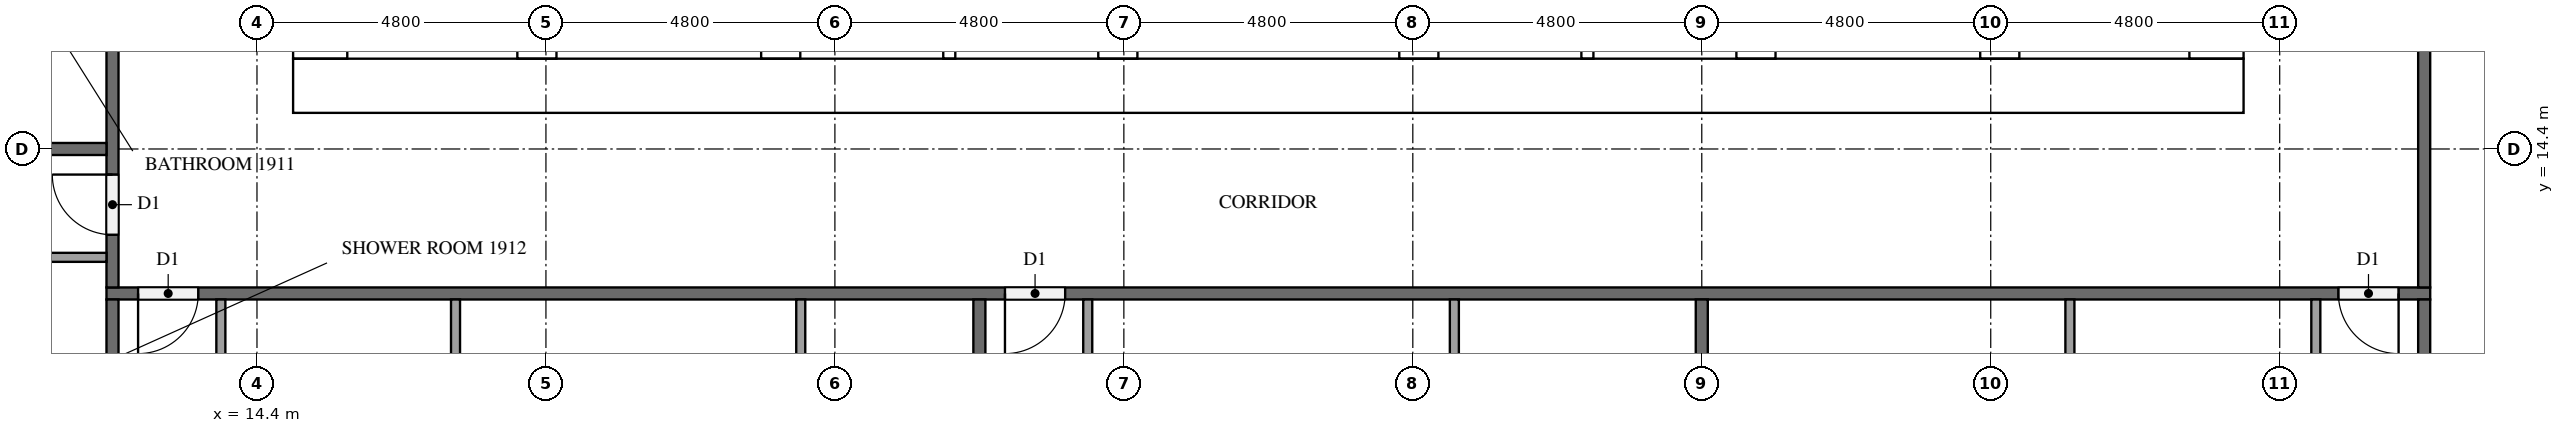
"""IFC4 building model, lengths in metres.
Left out: names, types, materials, properties, quantities, classifications, styles, units other than length and angle.
Written with IfcOpenShell. Run it as: python <this file> out.ifc"""

import sys

from ifc_helpers import new_model, si_unit, direction, frame, frame_2d, origin, place, context, subcontext, project, spatial, rectangle, extrude, element, fill, save


model = new_model("IFC4")
c1 = context("Model", 3, precision=1e-05, world=origin(), true_north=direction((0.0, 1.0)))
c2 = subcontext(c1, "Body", "Model", "MODEL_VIEW")
j1 = project(units=[si_unit("LENGTHUNIT", "METRE"), si_unit("PLANEANGLEUNIT", "RADIAN")], contexts=[c1])
p1 = place(None, origin())
s1 = spatial("IfcSite", under=j1, at=p1, CompositionType="ELEMENT")
p2 = place(p1, origin())
s2 = spatial("IfcBuilding", under=s1, at=p2, CompositionType="ELEMENT")
p3 = place(p2, frame((0.0, 0.0, 76.8)))
s3 = spatial("IfcBuildingStorey", under=s2, at=p3, CompositionType="ELEMENT", Elevation=76.8)
p4 = place(p3, frame((15.0, 15.45, 0.0), z_axis=(0.0, 0.0, 1.0), x_axis=(1.0, 0.0, 0.0)))
e1 = element("IfcWall", 1, at=p4, inside=s3, PredefinedType="SHEAR", context=c2, shape_type="SweptSolid", body=[
    extrude(rectangle(XDim=32.4, YDim=0.9, at=frame_2d((16.2, 0.0))), origin(), (0.0, 0.0, 1.0), 3.2),
])
p5 = place(p4, frame((15.3, 0.0, 0.0)))
e2 = element("IfcOpeningElement", 2, at=p5, cuts=e1, PredefinedType="OPENING", context=c2, shape_type="SweptSolid", body=[
    extrude(rectangle(XDim=1.8, YDim=2.1, at=frame_2d((0.9, 1.05))), frame((0.0, 0.46, 0.0), z_axis=(0.0, -1.0, 0.0), x_axis=(1.0, 0.0, 0.0)), (0.0, 0.0, 1.0), 0.92),
])
p6 = place(p3, frame((15.45, 15.9, 0.0), z_axis=(0.0, 0.0, 1.0), x_axis=(0.0, 1.0, 0.0)))
e3 = element("IfcWall", 3, at=p6, inside=s3, PredefinedType="SHEAR", context=c2, shape_type="SweptSolid", body=[
    extrude(rectangle(XDim=21.0, YDim=0.9, at=frame_2d((10.5, 0.0))), origin(), (0.0, 0.0, 1.0), 3.2),
])
p7 = place(p6, frame((4.86, 0.0, 0.0)))
e4 = element("IfcOpeningElement", 4, at=p7, cuts=e3, PredefinedType="OPENING", context=c2, shape_type="SweptSolid", body=[
    extrude(rectangle(XDim=1.2, YDim=2.1, at=frame_2d((0.6, 1.05))), frame((0.0, 0.46, 0.0), z_axis=(0.0, -1.0, 0.0), x_axis=(1.0, 0.0, 0.0)), (0.0, 0.0, 1.0), 0.92),
])
p8 = place(p3, frame((46.95, 15.9, 0.0), z_axis=(0.0, 0.0, 1.0), x_axis=(0.0, 1.0, 0.0)))
e5 = element("IfcWall", 5, at=p8, inside=s3, PredefinedType="SHEAR", context=c2, shape_type="SweptSolid", body=[
    extrude(rectangle(XDim=21.0, YDim=0.9, at=frame_2d((10.5, 0.0))), origin(), (0.0, 0.0, 1.0), 3.2),
])
p9 = place(p8, frame((10.2, 0.0, 0.0)))
e6 = element("IfcOpeningElement", 6, at=p9, cuts=e5, PredefinedType="OPENING", context=c2, shape_type="SweptSolid", body=[
    extrude(rectangle(XDim=1.2, YDim=2.1, at=frame_2d((0.6, 1.05))), frame((0.0, 0.46, 0.0), z_axis=(0.0, -1.0, 0.0), x_axis=(1.0, 0.0, 0.0)), (0.0, 0.0, 1.0), 0.92),
])
p10 = place(p3, frame((19.05, 15.9, 0.0), z_axis=(0.0, 0.0, 1.0), x_axis=(0.0, 1.0, 0.0)))
e7 = element("IfcWall", 7, at=p10, inside=s3, PredefinedType="SHEAR", context=c2, shape_type="SweptSolid", body=[
    extrude(rectangle(XDim=15.025, YDim=0.65, at=frame_2d((7.513, 0.0))), origin(), (0.0, 0.0, 1.0), 3.2),
])
p11 = place(p10, frame((9.55, 0.0, 0.0)))
e8 = element("IfcOpeningElement", 8, at=p11, cuts=e7, PredefinedType="OPENING", context=c2, shape_type="SweptSolid", body=[
    extrude(rectangle(XDim=1.1, YDim=2.1, at=frame_2d((0.55, 1.05))), frame((0.0, 0.335, 0.0), z_axis=(0.0, -1.0, 0.0), x_axis=(1.0, 0.0, 0.0)), (0.0, 0.0, 1.0), 0.67),
])
p12 = place(p10, frame((13.05, 0.0, 0.0)))
e9 = element("IfcOpeningElement", 9, at=p12, cuts=e7, PredefinedType="OPENING", context=c2, shape_type="SweptSolid", body=[
    extrude(rectangle(XDim=1.1, YDim=2.1, at=frame_2d((0.55, 1.05))), frame((0.0, 0.335, 0.0), z_axis=(0.0, -1.0, 0.0), x_axis=(1.0, 0.0, 0.0)), (0.0, 0.0, 1.0), 0.67),
])
p13 = place(p10, frame((0.3, 0.0, 0.0)))
e10 = element("IfcOpeningElement", 10, at=p13, cuts=e7, PredefinedType="OPENING", context=c2, shape_type="SweptSolid", body=[
    extrude(rectangle(XDim=1.2, YDim=2.1, at=frame_2d((0.6, 1.05))), frame((0.0, 0.335, 0.0), z_axis=(0.0, -1.0, 0.0), x_axis=(1.0, 0.0, 0.0)), (0.0, 0.0, 1.0), 0.67),
])
p14 = place(p3, frame((23.1, 15.9, 0.0), z_axis=(0.0, 0.0, 1.0), x_axis=(0.0, 1.0, 0.0)))
e11 = element("IfcWall", 11, at=p14, inside=s3, PredefinedType="SHEAR", context=c2, shape_type="SweptSolid", body=[
    extrude(rectangle(XDim=21.0, YDim=0.65, at=frame_2d((10.5, 0.0))), origin(), (0.0, 0.0, 1.0), 3.2),
])
p15 = place(p3, frame((39.3, 15.9, 0.0), z_axis=(0.0, 0.0, 1.0), x_axis=(0.0, 1.0, 0.0)))
e12 = element("IfcWall", 12, at=p15, inside=s3, PredefinedType="SHEAR", context=c2, shape_type="SweptSolid", body=[
    extrude(rectangle(XDim=8.35, YDim=0.65, at=frame_2d((4.175, 0.0))), origin(), (0.0, 0.0, 1.0), 3.2),
])
p16 = place(p3, frame((43.35, 15.9, 0.0), z_axis=(0.0, 0.0, 1.0), x_axis=(0.0, 1.0, 0.0)))
e13 = element("IfcWall", 13, at=p16, inside=s3, PredefinedType="SHEAR", context=c2, shape_type="SweptSolid", body=[
    extrude(rectangle(XDim=8.35, YDim=0.65, at=frame_2d((4.175, 0.0))), origin(), (0.0, 0.0, 1.0), 3.2),
])
p17 = place(p16, frame((0.3, 0.0, 0.0)))
e14 = element("IfcOpeningElement", 14, at=p17, cuts=e13, PredefinedType="OPENING", context=c2, shape_type="SweptSolid", body=[
    extrude(rectangle(XDim=1.2, YDim=2.1, at=frame_2d((0.6, 1.05))), frame((0.0, 0.335, 0.0), z_axis=(0.0, -1.0, 0.0), x_axis=(1.0, 0.0, 0.0)), (0.0, 0.0, 1.0), 0.67),
])
for number, where, z_axis, x_axis in (
    (15, (28.7, 15.9, 0.0), (0.0, 0.0, 1.0), (0.0, 1.0, 0.0)),
    (16, (33.7, 15.9, 0.0), (0.0, 0.0, 1.0), (0.0, 1.0, 0.0)),
):
    element("IfcWall", number, at=place(p3, frame(where, z_axis=z_axis, x_axis=x_axis)), inside=s3, PredefinedType="SHEAR", context=c2, shape_type="SweptSolid", body=[
        extrude(rectangle(XDim=2.525, YDim=0.65, at=frame_2d((1.263, 0.0))), origin(), (0.0, 0.0, 1.0), 3.2),
    ])
for number, where, z_axis, x_axis in (
    (17, (25.9, 15.9, 0.0), (0.0, 0.0, 1.0), (0.0, 1.0, 0.0)),
    (18, (36.5, 15.9, 0.0), (0.0, 0.0, 1.0), (0.0, 1.0, 0.0)),
):
    element("IfcWall", number, at=place(p3, frame(where, z_axis=z_axis, x_axis=x_axis)), inside=s3, PredefinedType="SOLIDWALL", context=c2, shape_type="SweptSolid", body=[
        extrude(rectangle(XDim=2.525, YDim=0.2, at=frame_2d((1.263, 0.0))), origin(), (0.0, 0.0, 1.0), 3.2),
    ])
p18 = place(p3, frame((50.5, 12.0, 0.0), z_axis=(0.0, 0.0, 1.0), x_axis=(-1.0, 0.0, 0.0)))
e19 = element("IfcWall", 19, at=p18, inside=s3, PredefinedType="PARTITIONING", context=c2, shape_type="SweptSolid", body=[
    extrude(rectangle(XDim=38.6, YDim=0.2, at=frame_2d((19.3, 0.0))), origin(), (0.0, 0.0, 1.0), 3.2),
])
p19 = place(p18, frame((37.075, 0.0, 0.0)))
e20 = element("IfcOpeningElement", 20, at=p19, cuts=e19, PredefinedType="OPENING", context=c2, shape_type="SweptSolid", body=[
    extrude(rectangle(XDim=1.0, YDim=2.1, at=frame_2d((0.5, 1.05))), frame((0.0, 0.11, 0.0), z_axis=(0.0, -1.0, 0.0), x_axis=(1.0, 0.0, 0.0)), (0.0, 0.0, 1.0), 0.22),
])
p20 = place(p18, frame((22.675, 0.0, 0.0)))
e21 = element("IfcOpeningElement", 21, at=p20, cuts=e19, PredefinedType="OPENING", context=c2, shape_type="SweptSolid", body=[
    extrude(rectangle(XDim=1.0, YDim=2.1, at=frame_2d((0.5, 1.05))), frame((0.0, 0.11, 0.0), z_axis=(0.0, -1.0, 0.0), x_axis=(1.0, 0.0, 0.0)), (0.0, 0.0, 1.0), 0.22),
])
p21 = place(p18, frame((0.525, 0.0, 0.0)))
e22 = element("IfcOpeningElement", 22, at=p21, cuts=e19, PredefinedType="OPENING", context=c2, shape_type="SweptSolid", body=[
    extrude(rectangle(XDim=1.0, YDim=2.1, at=frame_2d((0.5, 1.05))), frame((0.0, 0.11, 0.0), z_axis=(0.0, -1.0, 0.0), x_axis=(1.0, 0.0, 0.0)), (0.0, 0.0, 1.0), 0.22),
])
p22 = place(p3, frame((50.4, 40.7, 0.0), z_axis=(0.0, 0.0, 1.0), x_axis=(0.0, -1.0, 0.0)))
e23 = element("IfcWall", 23, at=p22, inside=s3, PredefinedType="PARTITIONING", context=c2, shape_type="SweptSolid", body=[
    extrude(rectangle(XDim=28.6, YDim=0.2, at=frame_2d((14.3, 0.0))), origin(), (0.0, 0.0, 1.0), 3.2),
])
p23 = place(p22, frame((21.875, 0.0, 0.0)))
e24 = element("IfcOpeningElement", 24, at=p23, cuts=e23, PredefinedType="OPENING", context=c2, shape_type="SweptSolid", body=[
    extrude(rectangle(XDim=1.1, YDim=2.1, at=frame_2d((0.55, 1.05))), frame((0.0, 0.11, 0.0), z_axis=(0.0, -1.0, 0.0), x_axis=(1.0, 0.0, 0.0)), (0.0, 0.0, 1.0), 0.22),
])
p24 = place(p22, frame((20.075, 0.0, 0.0)))
e25 = element("IfcOpeningElement", 25, at=p24, cuts=e23, PredefinedType="OPENING", context=c2, shape_type="SweptSolid", body=[
    extrude(rectangle(XDim=1.0, YDim=2.1, at=frame_2d((0.5, 1.05))), frame((0.0, 0.11, 0.0), z_axis=(0.0, -1.0, 0.0), x_axis=(1.0, 0.0, 0.0)), (0.0, 0.0, 1.0), 0.22),
])
p25 = place(p22, frame((5.675, 0.0, 0.0)))
e26 = element("IfcOpeningElement", 26, at=p25, cuts=e23, PredefinedType="OPENING", context=c2, shape_type="SweptSolid", body=[
    extrude(rectangle(XDim=1.0, YDim=2.1, at=frame_2d((0.5, 1.05))), frame((0.0, 0.11, 0.0), z_axis=(0.0, -1.0, 0.0), x_axis=(1.0, 0.0, 0.0)), (0.0, 0.0, 1.0), 0.22),
])
p26 = place(p3, frame((12.0, 12.1, 0.0), z_axis=(0.0, 0.0, 1.0), x_axis=(0.0, 1.0, 0.0)))
e27 = element("IfcWall", 27, at=p26, inside=s3, PredefinedType="PARTITIONING", context=c2, shape_type="SweptSolid", body=[
    extrude(rectangle(XDim=28.6, YDim=0.2, at=frame_2d((14.3, 0.0))), origin(), (0.0, 0.0, 1.0), 3.2),
])
p27 = place(p26, frame((14.725, 0.0, 0.0)))
e28 = element("IfcOpeningElement", 28, at=p27, cuts=e27, PredefinedType="OPENING", context=c2, shape_type="SweptSolid", body=[
    extrude(rectangle(XDim=1.0, YDim=2.1, at=frame_2d((0.5, 1.05))), frame((0.0, 0.11, 0.0), z_axis=(0.0, -1.0, 0.0), x_axis=(1.0, 0.0, 0.0)), (0.0, 0.0, 1.0), 0.22),
])
p28 = place(p26, frame((12.875, 0.0, 0.0)))
e29 = element("IfcOpeningElement", 29, at=p28, cuts=e27, PredefinedType="OPENING", context=c2, shape_type="SweptSolid", body=[
    extrude(rectangle(XDim=1.0, YDim=2.1, at=frame_2d((0.5, 1.05))), frame((0.0, 0.11, 0.0), z_axis=(0.0, -1.0, 0.0), x_axis=(1.0, 0.0, 0.0)), (0.0, 0.0, 1.0), 0.22),
])
p29 = place(p26, frame((0.875, 0.0, 0.0)))
e30 = element("IfcOpeningElement", 30, at=p29, cuts=e27, PredefinedType="OPENING", context=c2, shape_type="SweptSolid", body=[
    extrude(rectangle(XDim=1.0, YDim=2.1, at=frame_2d((0.5, 1.05))), frame((0.0, 0.11, 0.0), z_axis=(0.0, -1.0, 0.0), x_axis=(1.0, 0.0, 0.0)), (0.0, 0.0, 1.0), 0.22),
])
for number, where, z_axis, x_axis in (
    (31, (26.4, 11.9, 0.0), (0.0, 0.0, 1.0), (0.0, -1.0, 0.0)),
    (32, (12.0, 0.1, 0.0), (0.0, 0.0, 1.0), (0.0, 1.0, 0.0)),
):
    element("IfcWall", number, at=place(p3, frame(where, z_axis=z_axis, x_axis=x_axis)), inside=s3, PredefinedType="PARTITIONING", context=c2, shape_type="SweptSolid", body=[
        extrude(rectangle(XDim=11.8, YDim=0.2, at=frame_2d((5.9, 0.0))), origin(), (0.0, 0.0, 1.0), 3.2),
    ])
p30 = place(p3, frame((38.4, 11.9, 0.0), z_axis=(0.0, 0.0, 1.0), x_axis=(0.0, -1.0, 0.0)))
e33 = element("IfcWall", 33, at=p30, inside=s3, PredefinedType="PARTITIONING", context=c2, shape_type="SweptSolid", body=[
    extrude(rectangle(XDim=11.475, YDim=0.2, at=frame_2d((5.737, 0.0))), origin(), (0.0, 0.0, 1.0), 3.2),
])
p31 = place(p3, frame((50.4, 11.9, 0.0), z_axis=(0.0, 0.0, 1.0), x_axis=(0.0, -1.0, 0.0)))
e34 = element("IfcWall", 34, at=p31, inside=s3, PredefinedType="PARTITIONING", context=c2, shape_type="SweptSolid", body=[
    extrude(rectangle(XDim=11.8, YDim=0.2, at=frame_2d((5.9, 0.0))), origin(), (0.0, 0.0, 1.0), 3.2),
])
p32 = place(p3, frame((5.225, 14.4, 0.0), z_axis=(0.0, 0.0, 1.0), x_axis=(1.0, 0.0, 0.0)))
e35 = element("IfcWall", 35, at=p32, inside=s3, PredefinedType="PARTITIONING", context=c2, shape_type="SweptSolid", body=[
    extrude(rectangle(XDim=6.675, YDim=0.2, at=frame_2d((3.337, 0.0))), origin(), (0.0, 0.0, 1.0), 3.2),
])
for number, where, z_axis, x_axis in (
    (36, (17.698, 11.9, 0.0), (0.0, 0.0, 1.0), (0.0, -1.0, 0.0)),
    (37, (23.433, 11.9, 0.0), (0.0, 0.0, 1.0), (0.0, -1.0, 0.0)),
):
    element("IfcWall", number, at=place(p3, frame(where, z_axis=z_axis, x_axis=x_axis)), inside=s3, PredefinedType="PARTITIONING", context=c2, shape_type="SweptSolid", body=[
        extrude(rectangle(XDim=2.975, YDim=0.15, at=frame_2d((1.487, 0.0))), origin(), (0.0, 0.0, 1.0), 3.2),
    ])
p33 = place(p3, frame((13.8, 11.9, 0.0), z_axis=(0.0, 0.0, 1.0), x_axis=(0.0, -1.0, 0.0)))
e38 = element("IfcWall", 38, at=p33, inside=s3, PredefinedType="PARTITIONING", context=c2, shape_type="SweptSolid", body=[
    extrude(rectangle(XDim=3.125, YDim=0.15, at=frame_2d((1.562, 0.0))), origin(), (0.0, 0.0, 1.0), 3.2),
])
p34 = place(p3, frame((34.29, 11.9, 0.0), z_axis=(0.0, 0.0, 1.0), x_axis=(0.0, -1.0, 0.0)))
e39 = element("IfcWall", 39, at=p34, inside=s3, PredefinedType="PARTITIONING", context=c2, shape_type="SweptSolid", body=[
    extrude(rectangle(XDim=3.725, YDim=0.15, at=frame_2d((1.862, 0.0))), origin(), (0.0, 0.0, 1.0), 3.2),
])
p35 = place(p3, frame((28.2, 11.9, 0.0), z_axis=(0.0, 0.0, 1.0), x_axis=(0.0, -1.0, 0.0)))
e40 = element("IfcWall", 40, at=p35, inside=s3, PredefinedType="PARTITIONING", context=c2, shape_type="SweptSolid", body=[
    extrude(rectangle(XDim=3.875, YDim=0.15, at=frame_2d((1.938, 0.0))), origin(), (0.0, 0.0, 1.0), 3.2),
])
p36 = place(p3, frame((44.515, 11.9, 0.0), z_axis=(0.0, 0.0, 1.0), x_axis=(0.0, -1.0, 0.0)))
e41 = element("IfcWall", 41, at=p36, inside=s3, PredefinedType="PARTITIONING", context=c2, shape_type="SweptSolid", body=[
    extrude(rectangle(XDim=4.175, YDim=0.15, at=frame_2d((2.087, 0.0))), origin(), (0.0, 0.0, 1.0), 3.2),
])
p37 = place(p3, frame((48.6, 11.9, 0.0), z_axis=(0.0, 0.0, 1.0), x_axis=(0.0, -1.0, 0.0)))
e42 = element("IfcWall", 42, at=p37, inside=s3, PredefinedType="PARTITIONING", context=c2, shape_type="SweptSolid", body=[
    extrude(rectangle(XDim=4.325, YDim=0.15, at=frame_2d((2.163, 0.0))), origin(), (0.0, 0.0, 1.0), 3.2),
])
p38 = place(p3, frame((11.9, 12.6, 0.0), z_axis=(0.0, 0.0, 1.0), x_axis=(-1.0, 0.0, 0.0)))
e43 = element("IfcWall", 43, at=p38, inside=s3, PredefinedType="PARTITIONING", context=c2, shape_type="SweptSolid", body=[
    extrude(rectangle(XDim=2.075, YDim=0.15, at=frame_2d((1.038, 0.0))), origin(), (0.0, 0.0, 1.0), 3.2),
])
p39 = place(p5, frame((1.8, 0.0, 0.0), z_axis=(0.0, 0.0, 1.0), x_axis=(-1.0, 0.0, 0.0)))
e44 = element("IfcDoor", 44, at=p39, inside=s3, OperationType="DOUBLE_DOOR_SINGLE_SWING", PredefinedType="DOOR", context=c2, shape_type="SweptSolid", body=[
    extrude(rectangle(XDim=1.8, YDim=2.1, at=frame_2d((0.9, 1.05))), frame((0.0, 0.025, 0.0), z_axis=(0.0, -1.0, 0.0), x_axis=(1.0, 0.0, 0.0)), (0.0, 0.0, 1.0), 0.05),
])
fill(e2, e44)
p40 = place(p19, origin())
e45 = element("IfcDoor", 45, at=p40, inside=s3, OperationType="SINGLE_SWING_RIGHT", PredefinedType="DOOR", context=c2, shape_type="SweptSolid", body=[
    extrude(rectangle(XDim=1.0, YDim=2.1, at=frame_2d((0.5, 1.05))), frame((0.0, 0.025, 0.0), z_axis=(0.0, -1.0, 0.0), x_axis=(1.0, 0.0, 0.0)), (0.0, 0.0, 1.0), 0.05),
])
fill(e20, e45)
p41 = place(p20, origin())
e46 = element("IfcDoor", 46, at=p41, inside=s3, OperationType="SINGLE_SWING_RIGHT", PredefinedType="DOOR", context=c2, shape_type="SweptSolid", body=[
    extrude(rectangle(XDim=1.0, YDim=2.1, at=frame_2d((0.5, 1.05))), frame((0.0, 0.025, 0.0), z_axis=(0.0, -1.0, 0.0), x_axis=(1.0, 0.0, 0.0)), (0.0, 0.0, 1.0), 0.05),
])
fill(e21, e46)
p42 = place(p21, origin())
e47 = element("IfcDoor", 47, at=p42, inside=s3, OperationType="SINGLE_SWING_LEFT", PredefinedType="DOOR", context=c2, shape_type="SweptSolid", body=[
    extrude(rectangle(XDim=1.0, YDim=2.1, at=frame_2d((0.5, 1.05))), frame((0.0, 0.025, 0.0), z_axis=(0.0, -1.0, 0.0), x_axis=(1.0, 0.0, 0.0)), (0.0, 0.0, 1.0), 0.05),
])
fill(e22, e47)
p43 = place(p29, origin())
e48 = element("IfcDoor", 48, at=p43, inside=s3, OperationType="SINGLE_SWING_RIGHT", PredefinedType="DOOR", context=c2, shape_type="SweptSolid", body=[
    extrude(rectangle(XDim=1.0, YDim=2.1, at=frame_2d((0.5, 1.05))), frame((0.0, 0.025, 0.0), z_axis=(0.0, -1.0, 0.0), x_axis=(1.0, 0.0, 0.0)), (0.0, 0.0, 1.0), 0.05),
])
fill(e30, e48)
save(model, sys.argv[1])
